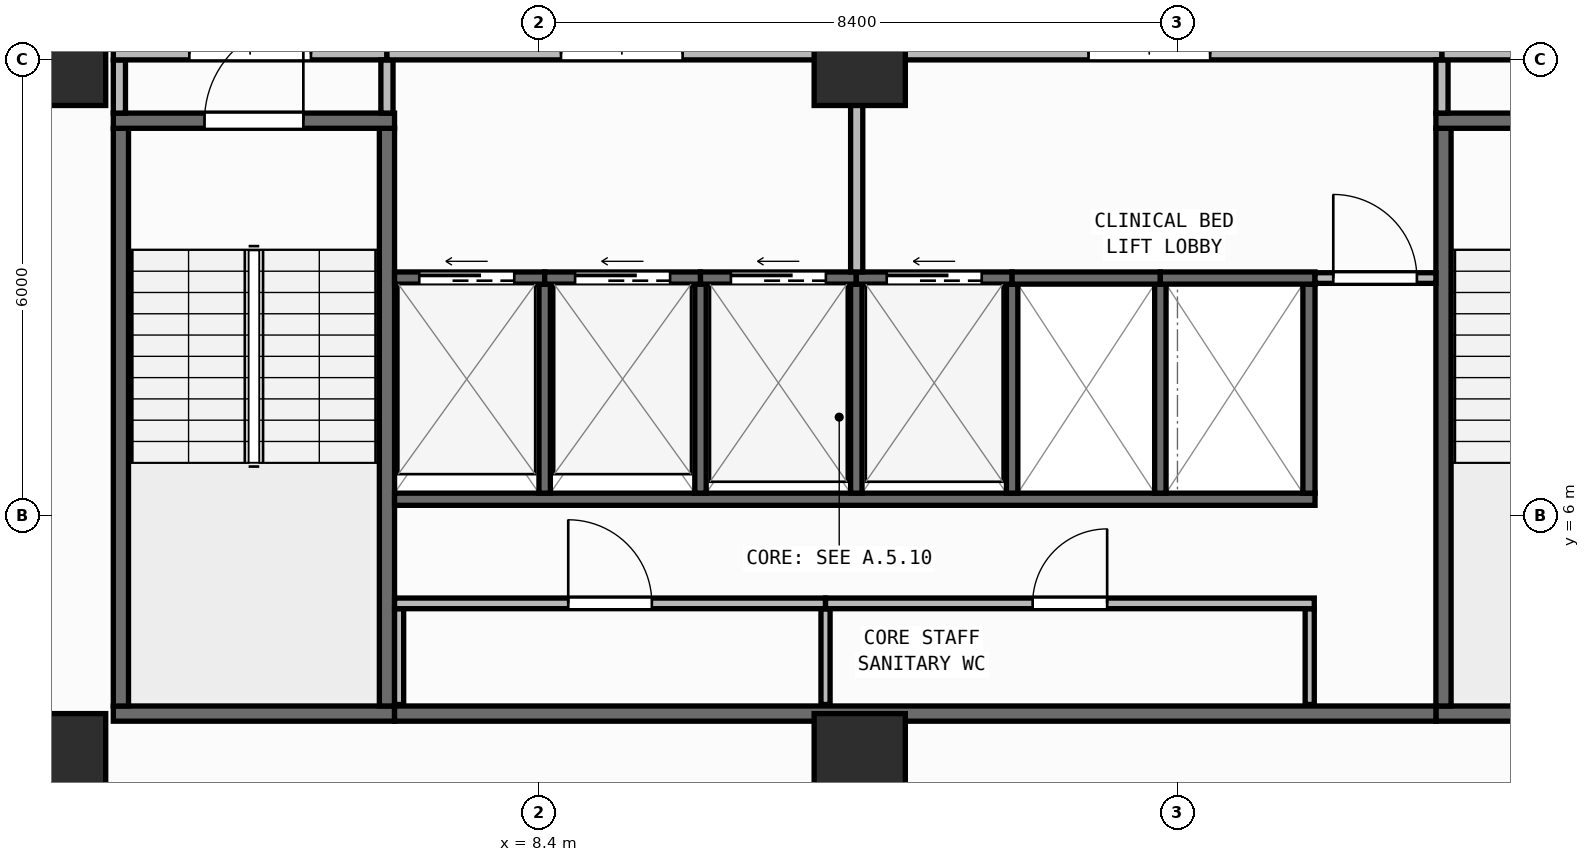
"""IFC4 building model, lengths in metres.
Left out: names, types, materials, properties, quantities, classifications, styles, units other than length and angle.
Written with IfcOpenShell. Run it as: python <this file> out.ifc"""

import sys

from ifc_helpers import new_model, si_unit, direction, frame, frame_2d, origin, origin_2d, place, context, subcontext, project, spatial, rectangle, extrude, element, fill, save


model = new_model("IFC4")
c1 = context("Model", 3, precision=1e-05, world=origin(), true_north=direction((0.0, 1.0)))
c2 = subcontext(c1, "Body", "Model", "MODEL_VIEW")
j1 = project(units=[si_unit("LENGTHUNIT", "METRE"), si_unit("PLANEANGLEUNIT", "RADIAN")], contexts=[c1])
p1 = place(None, origin())
s1 = spatial("IfcSite", under=j1, at=p1, CompositionType="ELEMENT")
p2 = place(p1, origin())
s2 = spatial("IfcBuilding", under=s1, at=p2, CompositionType="ELEMENT")
p3 = place(p2, frame((0.0, 0.0, 142.85)))
s3 = spatial("IfcBuildingStorey", under=s2, at=p3, CompositionType="ELEMENT", Elevation=142.85)
for number, where, z_axis, x_axis in (
    (1, (2.1, 2.8, 0.0), (0.0, 0.0, 1.0), (1.0, 0.0, 0.0)),
    (2, (12.62, 2.8, 0.0), (0.0, 0.0, 1.0), (1.0, 0.0, 0.0)),
    (3, (2.1, 12.0, 0.0), (0.0, 0.0, 1.0), (1.0, 0.0, 0.0)),
    (4, (12.62, 12.0, 0.0), (0.0, 0.0, 1.0), (1.0, 0.0, 0.0)),
):
    element("IfcColumn", number, at=place(p3, frame(where, z_axis=z_axis, x_axis=x_axis)), inside=s3, PredefinedType="COLUMN", context=c2, shape_type="SweptSolid", body=[
        extrude(rectangle(XDim=1.2, YDim=1.2, at=origin_2d()), origin(), (0.0, 0.0, 1.0), 3.95),
    ])
p4 = place(p3, frame((2.76, 0.173, 0.0), z_axis=(0.0, 0.0, 1.0), x_axis=(0.996857931723, 0.079210251617, 0.0)))
e5 = element("IfcWall", 5, at=p4, inside=s3, PredefinedType="STANDARD", context=c2, shape_type="SweptSolid", body=[
    extrude(rectangle(XDim=51.442, YDim=0.26, at=frame_2d((25.721, 0.0))), origin(), (0.0, 0.0, 1.0), 3.71),
])
p5 = place(p4, frame((24.521, 0.0, 0.9)))
e6 = element("IfcOpeningElement", 6, at=p5, cuts=e5, PredefinedType="OPENING", context=c2, shape_type="SweptSolid", body=[
    extrude(rectangle(XDim=2.4, YDim=1.65, at=frame_2d((1.2, 0.825))), frame((0.0, 0.14, 0.0), z_axis=(0.0, -1.0, 0.0), x_axis=(1.0, 0.0, 0.0)), (0.0, 0.0, 1.0), 0.28),
])
p6 = place(p3, frame((2.8, 3.4, 0.0), z_axis=(0.0, 0.0, 1.0), x_axis=(1.0, 0.0, 0.0)))
e7 = element("IfcWall", 7, at=p6, inside=s3, PredefinedType="SHEAR", context=c2, shape_type="SweptSolid", body=[
    extrude(rectangle(XDim=3.7, YDim=0.2, at=frame_2d((1.85, 0.0))), origin(), (0.0, 0.0, 1.0), 3.71),
])
for number, where, z_axis, x_axis in (
    (8, (2.9, 3.5, 0.0), (0.0, 0.0, 1.0), (0.0, 1.0, 0.0)),
    (9, (6.4, 3.5, 0.0), (0.0, 0.0, 1.0), (0.0, 1.0, 0.0)),
):
    element("IfcWall", number, at=place(p3, frame(where, z_axis=z_axis, x_axis=x_axis)), inside=s3, PredefinedType="SHEAR", context=c2, shape_type="SweptSolid", body=[
        extrude(rectangle(XDim=7.6, YDim=0.2, at=frame_2d((3.8, 0.0))), origin(), (0.0, 0.0, 1.0), 3.71),
    ])
p7 = place(p3, frame((2.8, 11.2, 0.0), z_axis=(0.0, 0.0, 1.0), x_axis=(1.0, 0.0, 0.0)))
e10 = element("IfcWall", 10, at=p7, inside=s3, PredefinedType="SHEAR", context=c2, shape_type="SweptSolid", body=[
    extrude(rectangle(XDim=3.7, YDim=0.2, at=frame_2d((1.85, 0.0))), origin(), (0.0, 0.0, 1.0), 3.71),
])
p8 = place(p7, frame((1.2, 0.0, 0.0)))
e11 = element("IfcOpeningElement", 11, at=p8, cuts=e10, PredefinedType="OPENING", context=c2, shape_type="SweptSolid", body=[
    extrude(rectangle(XDim=1.3, YDim=2.15, at=frame_2d((0.65, 1.075))), frame((0.0, 0.11, 0.0), z_axis=(0.0, -1.0, 0.0), x_axis=(1.0, 0.0, 0.0)), (0.0, 0.0, 1.0), 0.22),
])
p9 = place(p3, frame((20.2, 3.4, 0.0), z_axis=(0.0, 0.0, 1.0), x_axis=(1.0, 0.0, 0.0)))
e12 = element("IfcWall", 12, at=p9, inside=s3, PredefinedType="SHEAR", context=c2, shape_type="SweptSolid", body=[
    extrude(rectangle(XDim=3.7, YDim=0.2, at=frame_2d((1.85, 0.0))), origin(), (0.0, 0.0, 1.0), 3.71),
])
p10 = place(p3, frame((20.3, 3.5, 0.0), z_axis=(0.0, 0.0, 1.0), x_axis=(0.0, 1.0, 0.0)))
e13 = element("IfcWall", 13, at=p10, inside=s3, PredefinedType="SHEAR", context=c2, shape_type="SweptSolid", body=[
    extrude(rectangle(XDim=7.6, YDim=0.2, at=frame_2d((3.8, 0.0))), origin(), (0.0, 0.0, 1.0), 3.71),
])
p11 = place(p3, frame((20.2, 11.2, 0.0), z_axis=(0.0, 0.0, 1.0), x_axis=(1.0, 0.0, 0.0)))
e14 = element("IfcWall", 14, at=p11, inside=s3, PredefinedType="SHEAR", context=c2, shape_type="SweptSolid", body=[
    extrude(rectangle(XDim=3.7, YDim=0.2, at=frame_2d((1.85, 0.0))), origin(), (0.0, 0.0, 1.0), 3.71),
])
p12 = place(p11, frame((1.2, 0.0, 0.0)))
e15 = element("IfcOpeningElement", 15, at=p12, cuts=e14, PredefinedType="OPENING", context=c2, shape_type="SweptSolid", body=[
    extrude(rectangle(XDim=1.3, YDim=2.15, at=frame_2d((0.65, 1.075))), frame((0.0, 0.11, 0.0), z_axis=(0.0, -1.0, 0.0), x_axis=(1.0, 0.0, 0.0)), (0.0, 0.0, 1.0), 0.22),
])
p13 = place(p3, frame((6.5, 3.4, 0.0), z_axis=(0.0, 0.0, 1.0), x_axis=(1.0, 0.0, 0.0)))
e16 = element("IfcWall", 16, at=p13, inside=s3, PredefinedType="SHEAR", context=c2, shape_type="SweptSolid", body=[
    extrude(rectangle(XDim=13.7, YDim=0.2, at=frame_2d((6.85, 0.0))), origin(), (0.0, 0.0, 1.0), 3.71),
])
p14 = place(p3, frame((6.5, 6.22, 0.0), z_axis=(0.0, 0.0, 1.0), x_axis=(1.0, 0.0, 0.0)))
e17 = element("IfcWall", 17, at=p14, inside=s3, PredefinedType="SHEAR", context=c2, shape_type="SweptSolid", body=[
    extrude(rectangle(XDim=12.11, YDim=0.16, at=frame_2d((6.055, 0.0))), origin(), (0.0, 0.0, 1.0), 3.71),
])
p15 = place(p3, frame((18.53, 6.3, 0.0), z_axis=(0.0, 0.0, 1.0), x_axis=(0.0, 1.0, 0.0)))
e18 = element("IfcWall", 18, at=p15, inside=s3, PredefinedType="SHEAR", context=c2, shape_type="SweptSolid", body=[
    extrude(rectangle(XDim=2.75, YDim=0.16, at=frame_2d((1.375, 0.0))), origin(), (0.0, 0.0, 1.0), 3.71),
])
for number, where, z_axis, x_axis in (
    (19, (8.475, 6.3, 0.0), (0.0, 0.0, 1.0), (0.0, 1.0, 0.0)),
    (20, (10.525, 6.3, 0.0), (0.0, 0.0, 1.0), (0.0, 1.0, 0.0)),
    (21, (12.575, 6.3, 0.0), (0.0, 0.0, 1.0), (0.0, 1.0, 0.0)),
    (22, (14.625, 6.3, 0.0), (0.0, 0.0, 1.0), (0.0, 1.0, 0.0)),
    (23, (16.575, 6.3, 0.0), (0.0, 0.0, 1.0), (0.0, 1.0, 0.0)),
):
    element("IfcWall", number, at=place(p3, frame(where, z_axis=z_axis, x_axis=x_axis)), inside=s3, PredefinedType="SHEAR", context=c2, shape_type="SweptSolid", body=[
        extrude(rectangle(XDim=2.75, YDim=0.15, at=frame_2d((1.375, 0.0))), origin(), (0.0, 0.0, 1.0), 3.71),
    ])
p16 = place(p3, frame((6.5, 9.13, 0.0), z_axis=(0.0, 0.0, 1.0), x_axis=(1.0, 0.0, 0.0)))
e24 = element("IfcWall", 24, at=p16, inside=s3, PredefinedType="SHEAR", context=c2, shape_type="SweptSolid", body=[
    extrude(rectangle(XDim=1.975, YDim=0.16, at=frame_2d((0.988, 0.0))), origin(), (0.0, 0.0, 1.0), 3.71),
])
p17 = place(p16, frame((0.325, 0.0, 0.0)))
e25 = element("IfcOpeningElement", 25, at=p17, cuts=e24, PredefinedType="OPENING", context=c2, shape_type="SweptSolid", body=[
    extrude(rectangle(XDim=1.25, YDim=2.15, at=frame_2d((0.625, 1.075))), frame((0.0, 0.09, 0.0), z_axis=(0.0, -1.0, 0.0), x_axis=(1.0, 0.0, 0.0)), (0.0, 0.0, 1.0), 0.18),
])
p18 = place(p3, frame((8.475, 9.13, 0.0), z_axis=(0.0, 0.0, 1.0), x_axis=(1.0, 0.0, 0.0)))
e26 = element("IfcWall", 26, at=p18, inside=s3, PredefinedType="SHEAR", context=c2, shape_type="SweptSolid", body=[
    extrude(rectangle(XDim=2.05, YDim=0.16, at=frame_2d((1.025, 0.0))), origin(), (0.0, 0.0, 1.0), 3.71),
])
p19 = place(p18, frame((0.4, 0.0, 0.0)))
e27 = element("IfcOpeningElement", 27, at=p19, cuts=e26, PredefinedType="OPENING", context=c2, shape_type="SweptSolid", body=[
    extrude(rectangle(XDim=1.25, YDim=2.15, at=frame_2d((0.625, 1.075))), frame((0.0, 0.09, 0.0), z_axis=(0.0, -1.0, 0.0), x_axis=(1.0, 0.0, 0.0)), (0.0, 0.0, 1.0), 0.18),
])
p20 = place(p3, frame((10.525, 9.13, 0.0), z_axis=(0.0, 0.0, 1.0), x_axis=(1.0, 0.0, 0.0)))
e28 = element("IfcWall", 28, at=p20, inside=s3, PredefinedType="SHEAR", context=c2, shape_type="SweptSolid", body=[
    extrude(rectangle(XDim=2.05, YDim=0.16, at=frame_2d((1.025, 0.0))), origin(), (0.0, 0.0, 1.0), 3.71),
])
p21 = place(p20, frame((0.4, 0.0, 0.0)))
e29 = element("IfcOpeningElement", 29, at=p21, cuts=e28, PredefinedType="OPENING", context=c2, shape_type="SweptSolid", body=[
    extrude(rectangle(XDim=1.25, YDim=2.15, at=frame_2d((0.625, 1.075))), frame((0.0, 0.09, 0.0), z_axis=(0.0, -1.0, 0.0), x_axis=(1.0, 0.0, 0.0)), (0.0, 0.0, 1.0), 0.18),
])
p22 = place(p3, frame((12.575, 9.13, 0.0), z_axis=(0.0, 0.0, 1.0), x_axis=(1.0, 0.0, 0.0)))
e30 = element("IfcWall", 30, at=p22, inside=s3, PredefinedType="SHEAR", context=c2, shape_type="SweptSolid", body=[
    extrude(rectangle(XDim=2.05, YDim=0.16, at=frame_2d((1.025, 0.0))), origin(), (0.0, 0.0, 1.0), 3.71),
])
p23 = place(p22, frame((0.4, 0.0, 0.0)))
e31 = element("IfcOpeningElement", 31, at=p23, cuts=e30, PredefinedType="OPENING", context=c2, shape_type="SweptSolid", body=[
    extrude(rectangle(XDim=1.25, YDim=2.15, at=frame_2d((0.625, 1.075))), frame((0.0, 0.09, 0.0), z_axis=(0.0, -1.0, 0.0), x_axis=(1.0, 0.0, 0.0)), (0.0, 0.0, 1.0), 0.18),
])
p24 = place(p3, frame((14.625, 9.13, 0.0), z_axis=(0.0, 0.0, 1.0), x_axis=(1.0, 0.0, 0.0)))
e32 = element("IfcWall", 32, at=p24, inside=s3, PredefinedType="SHEAR", context=c2, shape_type="SweptSolid", body=[
    extrude(rectangle(XDim=1.95, YDim=0.16, at=frame_2d((0.975, 0.0))), origin(), (0.0, 0.0, 1.0), 3.71),
])
p25 = place(p3, frame((16.575, 9.13, 0.0), z_axis=(0.0, 0.0, 1.0), x_axis=(1.0, 0.0, 0.0)))
e33 = element("IfcWall", 33, at=p25, inside=s3, PredefinedType="SHEAR", context=c2, shape_type="SweptSolid", body=[
    extrude(rectangle(XDim=2.035, YDim=0.16, at=frame_2d((1.018, 0.0))), origin(), (0.0, 0.0, 1.0), 3.71),
])
for number, where, z_axis, x_axis in (
    (34, (6.56, 3.52, 0.0), (0.0, 0.0, 1.0), (0.0, 1.0, 0.0)),
    (35, (12.17, 3.52, 0.0), (0.0, 0.0, 1.0), (0.0, 1.0, 0.0)),
    (36, (18.54, 3.52, 0.0), (0.0, 0.0, 1.0), (0.0, 1.0, 0.0)),
):
    element("IfcWall", number, at=place(p3, frame(where, z_axis=z_axis, x_axis=x_axis)), inside=s3, PredefinedType="PARTITIONING", context=c2, shape_type="SweptSolid", body=[
        extrude(rectangle(XDim=1.26, YDim=0.12, at=frame_2d((0.63, 0.0))), origin(), (0.0, 0.0, 1.0), 3.71),
    ])
p26 = place(p3, frame((6.5, 4.85, 0.0), z_axis=(0.0, 0.0, 1.0), x_axis=(1.0, 0.0, 0.0)))
e37 = element("IfcWall", 37, at=p26, inside=s3, PredefinedType="PARTITIONING", context=c2, shape_type="SweptSolid", body=[
    extrude(rectangle(XDim=5.67, YDim=0.14, at=frame_2d((2.835, 0.0))), origin(), (0.0, 0.0, 1.0), 3.71),
])
p27 = place(p26, frame((2.285, 0.0, 0.0)))
e38 = element("IfcOpeningElement", 38, at=p27, cuts=e37, PredefinedType="OPENING", context=c2, shape_type="SweptSolid", body=[
    extrude(rectangle(XDim=1.1, YDim=2.1, at=frame_2d((0.55, 1.05))), frame((0.0, 0.08, 0.0), z_axis=(0.0, -1.0, 0.0), x_axis=(1.0, 0.0, 0.0)), (0.0, 0.0, 1.0), 0.16),
])
p28 = place(p3, frame((12.17, 4.85, 0.0), z_axis=(0.0, 0.0, 1.0), x_axis=(1.0, 0.0, 0.0)))
e39 = element("IfcWall", 39, at=p28, inside=s3, PredefinedType="PARTITIONING", context=c2, shape_type="SweptSolid", body=[
    extrude(rectangle(XDim=6.43, YDim=0.14, at=frame_2d((3.215, 0.0))), origin(), (0.0, 0.0, 1.0), 3.71),
])
p29 = place(p28, frame((2.725, 0.0, 0.0)))
e40 = element("IfcOpeningElement", 40, at=p29, cuts=e39, PredefinedType="OPENING", context=c2, shape_type="SweptSolid", body=[
    extrude(rectangle(XDim=0.98, YDim=2.1, at=frame_2d((0.49, 1.05))), frame((0.0, 0.08, 0.0), z_axis=(0.0, -1.0, 0.0), x_axis=(1.0, 0.0, 0.0)), (0.0, 0.0, 1.0), 0.16),
])
p30 = place(p3, frame((18.61, 9.13, 0.0), z_axis=(0.0, 0.0, 1.0), x_axis=(1.0, 0.0, 0.0)))
e41 = element("IfcWall", 41, at=p30, inside=s3, PredefinedType="PARTITIONING", context=c2, shape_type="SweptSolid", body=[
    extrude(rectangle(XDim=1.59, YDim=0.14, at=frame_2d((0.795, 0.0))), origin(), (0.0, 0.0, 1.0), 3.71),
])
p31 = place(p30, frame((0.24, 0.0, 0.0)))
e42 = element("IfcOpeningElement", 42, at=p31, cuts=e41, PredefinedType="OPENING", context=c2, shape_type="SweptSolid", body=[
    extrude(rectangle(XDim=1.1, YDim=2.1, at=frame_2d((0.55, 1.05))), frame((0.0, 0.08, 0.0), z_axis=(0.0, -1.0, 0.0), x_axis=(1.0, 0.0, 0.0)), (0.0, 0.0, 1.0), 0.16),
])
p32 = place(p3, frame((2.88, 11.3, 0.0), z_axis=(0.0, 0.0, 1.0), x_axis=(0.0, 1.0, 0.0)))
e43 = element("IfcWall", 43, at=p32, inside=s3, PredefinedType="PARTITIONING", context=c2, shape_type="SweptSolid", body=[
    extrude(rectangle(XDim=0.7, YDim=0.16, at=frame_2d((0.35, 0.0))), origin(), (0.0, 0.0, 1.0), 3.71),
])
p33 = place(p3, frame((2.8, 12.08, 0.0), z_axis=(0.0, 0.0, 1.0), x_axis=(1.0, 0.0, 0.0)))
e44 = element("IfcWall", 44, at=p33, inside=s3, PredefinedType="PARTITIONING", context=c2, shape_type="SweptSolid", body=[
    extrude(rectangle(XDim=3.6, YDim=0.16, at=frame_2d((1.8, 0.0))), origin(), (0.0, 0.0, 1.0), 3.083),
])
p34 = place(p33, frame((1.0, 0.0, 0.0)))
e45 = element("IfcOpeningElement", 45, at=p34, cuts=e44, PredefinedType="OPENING", context=c2, shape_type="SweptSolid", body=[
    extrude(rectangle(XDim=1.6, YDim=2.05, at=frame_2d((0.8, 1.025))), frame((0.0, 0.09, 0.0), z_axis=(0.0, -1.0, 0.0), x_axis=(1.0, 0.0, 0.0)), (0.0, 0.0, 1.0), 0.18),
])
p35 = place(p3, frame((6.4, 11.3, 0.0), z_axis=(0.0, 0.0, 1.0), x_axis=(0.0, 1.0, 0.0)))
e46 = element("IfcWall", 46, at=p35, inside=s3, PredefinedType="PARTITIONING", context=c2, shape_type="SweptSolid", body=[
    extrude(rectangle(XDim=0.7, YDim=0.16, at=frame_2d((0.35, 0.0))), origin(), (0.0, 0.0, 1.0), 3.71),
])
p36 = place(p3, frame((6.4, 12.08, 0.0), z_axis=(0.0, 0.0, 1.0), x_axis=(1.0, 0.0, 0.0)))
e47 = element("IfcWall", 47, at=p36, inside=s3, PredefinedType="PARTITIONING", context=c2, shape_type="SweptSolid", body=[
    extrude(rectangle(XDim=6.18, YDim=0.16, at=frame_2d((3.09, 0.0))), origin(), (0.0, 0.0, 1.0), 3.083),
])
p37 = place(p36, frame((2.29, 0.0, 0.0)))
e48 = element("IfcOpeningElement", 48, at=p37, cuts=e47, PredefinedType="OPENING", context=c2, shape_type="SweptSolid", body=[
    extrude(rectangle(XDim=1.6, YDim=2.05, at=frame_2d((0.8, 1.025))), frame((0.0, 0.09, 0.0), z_axis=(0.0, -1.0, 0.0), x_axis=(1.0, 0.0, 0.0)), (0.0, 0.0, 1.0), 0.18),
])
p38 = place(p3, frame((12.58, 9.21, 0.0), z_axis=(0.0, 0.0, 1.0), x_axis=(0.0, 1.0, 0.0)))
e49 = element("IfcWall", 49, at=p38, inside=s3, PredefinedType="PARTITIONING", context=c2, shape_type="SweptSolid", body=[
    extrude(rectangle(XDim=2.79, YDim=0.16, at=frame_2d((1.395, 0.0))), origin(), (0.0, 0.0, 1.0), 3.71),
])
p39 = place(p3, frame((12.58, 12.08, 0.0), z_axis=(0.0, 0.0, 1.0), x_axis=(1.0, 0.0, 0.0)))
e50 = element("IfcWall", 50, at=p39, inside=s3, PredefinedType="PARTITIONING", context=c2, shape_type="SweptSolid", body=[
    extrude(rectangle(XDim=7.7, YDim=0.16, at=frame_2d((3.85, 0.0))), origin(), (0.0, 0.0, 1.0), 3.083),
])
p40 = place(p39, frame((3.05, 0.0, 0.0)))
e51 = element("IfcOpeningElement", 51, at=p40, cuts=e50, PredefinedType="OPENING", context=c2, shape_type="SweptSolid", body=[
    extrude(rectangle(XDim=1.6, YDim=2.05, at=frame_2d((0.8, 1.025))), frame((0.0, 0.09, 0.0), z_axis=(0.0, -1.0, 0.0), x_axis=(1.0, 0.0, 0.0)), (0.0, 0.0, 1.0), 0.18),
])
p41 = place(p3, frame((20.28, 11.3, 0.0), z_axis=(0.0, 0.0, 1.0), x_axis=(0.0, 1.0, 0.0)))
e52 = element("IfcWall", 52, at=p41, inside=s3, PredefinedType="PARTITIONING", context=c2, shape_type="SweptSolid", body=[
    extrude(rectangle(XDim=0.7, YDim=0.16, at=frame_2d((0.35, 0.0))), origin(), (0.0, 0.0, 1.0), 3.71),
])
p42 = place(p3, frame((20.28, 12.08, 0.0), z_axis=(0.0, 0.0, 1.0), x_axis=(1.0, 0.0, 0.0)))
e53 = element("IfcWall", 53, at=p42, inside=s3, PredefinedType="PARTITIONING", context=c2, shape_type="SweptSolid", body=[
    extrude(rectangle(XDim=3.62, YDim=0.16, at=frame_2d((1.81, 0.0))), origin(), (0.0, 0.0, 1.0), 3.083),
])
p43 = place(p42, frame((1.01, 0.0, 0.0)))
e54 = element("IfcOpeningElement", 54, at=p43, cuts=e53, PredefinedType="OPENING", context=c2, shape_type="SweptSolid", body=[
    extrude(rectangle(XDim=1.6, YDim=2.05, at=frame_2d((0.8, 1.025))), frame((0.0, 0.09, 0.0), z_axis=(0.0, -1.0, 0.0), x_axis=(1.0, 0.0, 0.0)), (0.0, 0.0, 1.0), 0.18),
])
p44 = place(p8, origin())
e55 = element("IfcDoor", 55, at=p44, inside=s3, OperationType="SINGLE_SWING_RIGHT", PredefinedType="DOOR", context=c2, shape_type="SweptSolid", body=[
    extrude(rectangle(XDim=1.3, YDim=2.15, at=frame_2d((0.65, 1.075))), frame((0.0, 0.025, 0.0), z_axis=(0.0, -1.0, 0.0), x_axis=(1.0, 0.0, 0.0)), (0.0, 0.0, 1.0), 0.05),
])
fill(e11, e55)
p45 = place(p17, origin())
e56 = element("IfcDoor", 56, at=p45, inside=s3, OperationType="SLIDING_TO_LEFT", PredefinedType="DOOR", context=c2, shape_type="SweptSolid", body=[
    extrude(rectangle(XDim=1.25, YDim=2.15, at=frame_2d((0.625, 1.075))), frame((0.0, 0.025, 0.0), z_axis=(0.0, -1.0, 0.0), x_axis=(1.0, 0.0, 0.0)), (0.0, 0.0, 1.0), 0.05),
])
fill(e25, e56)
p46 = place(p19, origin())
e57 = element("IfcDoor", 57, at=p46, inside=s3, OperationType="SLIDING_TO_LEFT", PredefinedType="DOOR", context=c2, shape_type="SweptSolid", body=[
    extrude(rectangle(XDim=1.25, YDim=2.15, at=frame_2d((0.625, 1.075))), frame((0.0, 0.025, 0.0), z_axis=(0.0, -1.0, 0.0), x_axis=(1.0, 0.0, 0.0)), (0.0, 0.0, 1.0), 0.05),
])
fill(e27, e57)
p47 = place(p21, origin())
e58 = element("IfcDoor", 58, at=p47, inside=s3, OperationType="SLIDING_TO_LEFT", PredefinedType="DOOR", context=c2, shape_type="SweptSolid", body=[
    extrude(rectangle(XDim=1.25, YDim=2.15, at=frame_2d((0.625, 1.075))), frame((0.0, 0.025, 0.0), z_axis=(0.0, -1.0, 0.0), x_axis=(1.0, 0.0, 0.0)), (0.0, 0.0, 1.0), 0.05),
])
fill(e29, e58)
p48 = place(p23, origin())
e59 = element("IfcDoor", 59, at=p48, inside=s3, OperationType="SLIDING_TO_LEFT", PredefinedType="DOOR", context=c2, shape_type="SweptSolid", body=[
    extrude(rectangle(XDim=1.25, YDim=2.15, at=frame_2d((0.625, 1.075))), frame((0.0, 0.025, 0.0), z_axis=(0.0, -1.0, 0.0), x_axis=(1.0, 0.0, 0.0)), (0.0, 0.0, 1.0), 0.05),
])
fill(e31, e59)
p49 = place(p27, origin())
e60 = element("IfcDoor", 60, at=p49, inside=s3, OperationType="SINGLE_SWING_LEFT", PredefinedType="DOOR", context=c2, shape_type="SweptSolid", body=[
    extrude(rectangle(XDim=1.1, YDim=2.1, at=frame_2d((0.55, 1.05))), frame((0.0, 0.025, 0.0), z_axis=(0.0, -1.0, 0.0), x_axis=(1.0, 0.0, 0.0)), (0.0, 0.0, 1.0), 0.05),
])
fill(e38, e60)
p50 = place(p29, origin())
e61 = element("IfcDoor", 61, at=p50, inside=s3, OperationType="SINGLE_SWING_RIGHT", PredefinedType="DOOR", context=c2, shape_type="SweptSolid", body=[
    extrude(rectangle(XDim=0.98, YDim=2.1, at=frame_2d((0.49, 1.05))), frame((0.0, 0.025, 0.0), z_axis=(0.0, -1.0, 0.0), x_axis=(1.0, 0.0, 0.0)), (0.0, 0.0, 1.0), 0.05),
])
fill(e40, e61)
p51 = place(p31, origin())
e62 = element("IfcDoor", 62, at=p51, inside=s3, OperationType="SINGLE_SWING_LEFT", PredefinedType="DOOR", context=c2, shape_type="SweptSolid", body=[
    extrude(rectangle(XDim=1.1, YDim=2.1, at=frame_2d((0.55, 1.05))), frame((0.0, 0.025, 0.0), z_axis=(0.0, -1.0, 0.0), x_axis=(1.0, 0.0, 0.0)), (0.0, 0.0, 1.0), 0.05),
])
fill(e42, e62)
p52 = place(p34, origin())
e63 = element("IfcDoor", 63, at=p52, inside=s3, OperationType="DOUBLE_DOOR_SINGLE_SWING", PredefinedType="DOOR", context=c2, shape_type="SweptSolid", body=[
    extrude(rectangle(XDim=1.6, YDim=2.05, at=frame_2d((0.8, 1.025))), frame((0.0, 0.025, 0.0), z_axis=(0.0, -1.0, 0.0), x_axis=(1.0, 0.0, 0.0)), (0.0, 0.0, 1.0), 0.05),
])
fill(e45, e63)
p53 = place(p37, origin())
e64 = element("IfcDoor", 64, at=p53, inside=s3, OperationType="DOUBLE_DOOR_SINGLE_SWING", PredefinedType="DOOR", context=c2, shape_type="SweptSolid", body=[
    extrude(rectangle(XDim=1.6, YDim=2.05, at=frame_2d((0.8, 1.025))), frame((0.0, 0.025, 0.0), z_axis=(0.0, -1.0, 0.0), x_axis=(1.0, 0.0, 0.0)), (0.0, 0.0, 1.0), 0.05),
])
fill(e48, e64)
p54 = place(p40, origin())
e65 = element("IfcDoor", 65, at=p54, inside=s3, OperationType="DOUBLE_DOOR_SINGLE_SWING", PredefinedType="DOOR", context=c2, shape_type="SweptSolid", body=[
    extrude(rectangle(XDim=1.6, YDim=2.05, at=frame_2d((0.8, 1.025))), frame((0.0, 0.025, 0.0), z_axis=(0.0, -1.0, 0.0), x_axis=(1.0, 0.0, 0.0)), (0.0, 0.0, 1.0), 0.05),
])
fill(e51, e65)
save(model, sys.argv[1])
